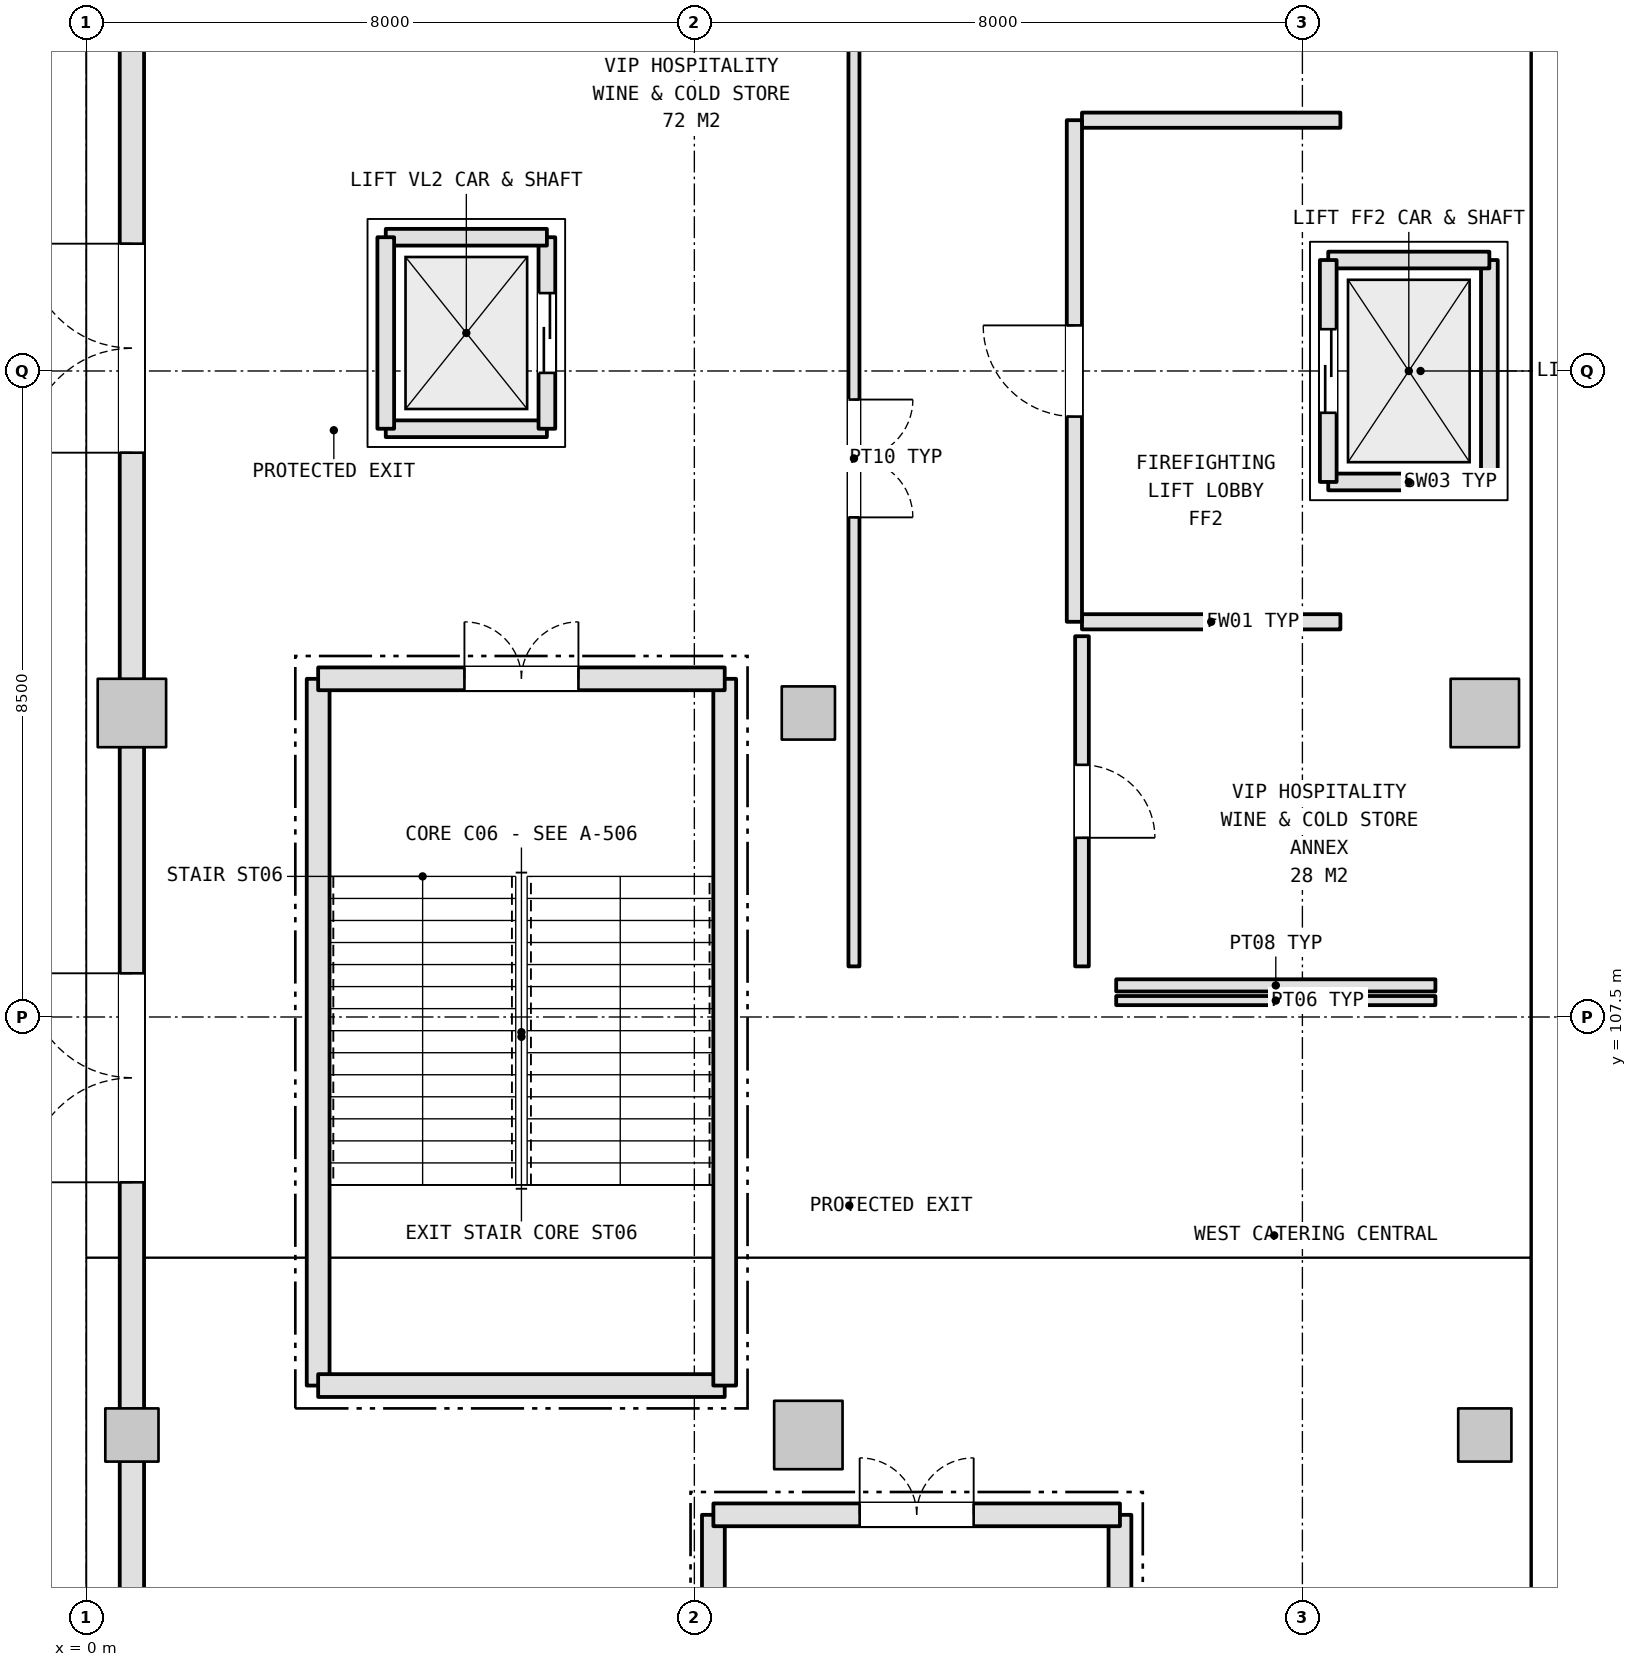
"""IFC4 building model, lengths in metres.
Left out: names, types, materials, properties, quantities, classifications, styles, units other than length and angle.
Written with IfcOpenShell. Run it as: python <this file> out.ifc"""

import sys

from ifc_helpers import new_model, si_unit, direction, frame, frame_2d, origin, origin_2d, place, context, subcontext, project, spatial, rectangle, extrude, element, fill, save


model = new_model("IFC4")
c1 = context("Model", 3, precision=1e-05, world=origin(), true_north=direction((0.0, 1.0)))
c2 = subcontext(c1, "Body", "Model", "MODEL_VIEW")
j1 = project(units=[si_unit("LENGTHUNIT", "METRE"), si_unit("PLANEANGLEUNIT", "RADIAN")], contexts=[c1])
p1 = place(None, origin())
s1 = spatial("IfcSite", under=j1, at=p1, CompositionType="ELEMENT")
p2 = place(p1, origin())
s2 = spatial("IfcBuilding", under=s1, at=p2, CompositionType="ELEMENT")
p3 = place(p2, origin())
s3 = spatial("IfcBuildingStorey", under=s2, at=p3, CompositionType="ELEMENT", Elevation=0.0)
p4 = place(p3, frame((0.6, 102.0, 0.0), z_axis=(0.0, 0.0, 1.0), x_axis=(1.0, 0.0, 0.0)))
e1 = element("IfcColumn", 1, at=p4, inside=s3, PredefinedType="COLUMN", context=c2, shape_type="SweptSolid", body=[
    extrude(rectangle(XDim=0.7, YDim=0.7, at=origin_2d()), origin(), (0.0, 0.0, 1.0), 5.4),
])
for number, where, z_axis, x_axis in (
    (2, (0.6, 111.5, 0.0), (0.0, 0.0, 1.0), (1.0, 0.0, 0.0)),
    (3, (9.5, 102.0, 0.0), (0.0, 0.0, 1.0), (1.0, 0.0, 0.0)),
):
    element("IfcColumn", number, at=place(p3, frame(where, z_axis=z_axis, x_axis=x_axis)), inside=s3, PredefinedType="COLUMN", context=c2, shape_type="SweptSolid", body=[
        extrude(rectangle(XDim=0.9, YDim=0.9, at=origin_2d()), origin(), (0.0, 0.0, 1.0), 5.4),
    ])
for number, where, z_axis, x_axis in (
    (4, (9.5, 111.5, 0.0), (0.0, 0.0, 1.0), (1.0, 0.0, 0.0)),
    (5, (18.4, 102.0, 0.0), (0.0, 0.0, 1.0), (1.0, 0.0, 0.0)),
):
    element("IfcColumn", number, at=place(p3, frame(where, z_axis=z_axis, x_axis=x_axis)), inside=s3, PredefinedType="COLUMN", context=c2, shape_type="SweptSolid", body=[
        extrude(rectangle(XDim=0.7, YDim=0.7, at=origin_2d()), origin(), (0.0, 0.0, 1.0), 5.4),
    ])
p5 = place(p3, frame((18.4, 111.5, 0.0), z_axis=(0.0, 0.0, 1.0), x_axis=(1.0, 0.0, 0.0)))
e6 = element("IfcColumn", 6, at=p5, inside=s3, PredefinedType="COLUMN", context=c2, shape_type="SweptSolid", body=[
    extrude(rectangle(XDim=0.9, YDim=0.9, at=origin_2d()), origin(), (0.0, 0.0, 1.0), 5.4),
])
p6 = place(p3, frame((22.827, 114.239, 0.0), z_axis=(0.0, 0.0, 1.0), x_axis=(-0.19509817024, -0.980783719262, 0.0)))
e7 = element("IfcWall", 7, at=p6, inside=s3, PredefinedType="SOLIDWALL", context=c2, shape_type="SweptSolid", body=[
    extrude(rectangle(XDim=19.188, YDim=0.34, at=frame_2d((9.594, 0.0))), origin(), (0.0, 0.0, 1.0), 4.275),
])
p7 = place(p6, frame((8.794, 0.0, 2.4)))
e8 = element("IfcOpeningElement", 8, at=p7, cuts=e7, PredefinedType="OPENING", context=c2, shape_type="SweptSolid", body=[
    extrude(rectangle(XDim=1.6, YDim=1.2, at=frame_2d((0.8, 0.6))), frame((0.0, 0.18, 0.0), z_axis=(0.0, -1.0, 0.0), x_axis=(1.0, 0.0, 0.0)), (0.0, 0.0, 1.0), 0.36),
])
p8 = place(p3, frame((0.6, 92.938, 0.0), z_axis=(0.0, 0.0, 1.0), x_axis=(0.0, 1.0, 0.0)))
e9 = element("IfcWall", 9, at=p8, inside=s3, PredefinedType="SOLIDWALL", context=c2, shape_type="SweptSolid", body=[
    extrude(rectangle(XDim=8.724, YDim=0.32, at=frame_2d((4.362, 0.0))), origin(), (0.0, 0.0, 1.0), 4.475),
])
p9 = place(p8, frame((3.612, 0.0, 1.05)))
e10 = element("IfcOpeningElement", 10, at=p9, cuts=e9, PredefinedType="OPENING", context=c2, shape_type="SweptSolid", body=[
    extrude(rectangle(XDim=1.5, YDim=1.5, at=frame_2d((0.75, 0.75))), frame((0.0, 0.17, 0.0), z_axis=(0.0, -1.0, 0.0), x_axis=(1.0, 0.0, 0.0)), (0.0, 0.0, 1.0), 0.34),
])
p10 = place(p3, frame((0.6, 102.338, 0.0), z_axis=(0.0, 0.0, 1.0), x_axis=(0.0, 1.0, 0.0)))
e11 = element("IfcWall", 11, at=p10, inside=s3, PredefinedType="SOLIDWALL", context=c2, shape_type="SweptSolid", body=[
    extrude(rectangle(XDim=8.724, YDim=0.32, at=frame_2d((4.362, 0.0))), origin(), (0.0, 0.0, 1.0), 4.475),
])
p11 = place(p10, frame((2.987, 0.0, 0.0)))
e12 = element("IfcOpeningElement", 12, at=p11, cuts=e11, PredefinedType="OPENING", context=c2, shape_type="SweptSolid", body=[
    extrude(rectangle(XDim=2.75, YDim=2.4, at=frame_2d((1.375, 1.2))), frame((0.0, 0.17, 0.0), z_axis=(0.0, -1.0, 0.0), x_axis=(1.0, 0.0, 0.0)), (0.0, 0.0, 1.0), 0.34),
])
p12 = place(p3, frame((0.6, 111.938, 0.0), z_axis=(0.0, 0.0, 1.0), x_axis=(0.0, 1.0, 0.0)))
e13 = element("IfcWall", 13, at=p12, inside=s3, PredefinedType="SOLIDWALL", context=c2, shape_type="SweptSolid", body=[
    extrude(rectangle(XDim=8.724, YDim=0.32, at=frame_2d((4.362, 0.0))), origin(), (0.0, 0.0, 1.0), 4.475),
])
p13 = place(p12, frame((2.987, 0.0, 0.0)))
e14 = element("IfcOpeningElement", 14, at=p13, cuts=e13, PredefinedType="OPENING", context=c2, shape_type="SweptSolid", body=[
    extrude(rectangle(XDim=2.75, YDim=2.4, at=frame_2d((1.375, 1.2))), frame((0.0, 0.17, 0.0), z_axis=(0.0, -1.0, 0.0), x_axis=(1.0, 0.0, 0.0)), (0.0, 0.0, 1.0), 0.34),
])
p14 = place(p3, frame((3.05, 111.95, 0.0), z_axis=(0.0, 0.0, 1.0), x_axis=(0.0, -1.0, 0.0)))
e15 = element("IfcWall", 15, at=p14, inside=s3, PredefinedType="SHEAR", context=c2, shape_type="SweptSolid", body=[
    extrude(rectangle(XDim=9.299, YDim=0.3, at=frame_2d((4.65, 0.0))), origin(), (0.0, 0.0, 1.0), 5.14),
])
p15 = place(p3, frame((3.05, 102.65, 0.0), z_axis=(0.0, 0.0, 1.0), x_axis=(1.0, 0.0, 0.0)))
e16 = element("IfcWall", 16, at=p15, inside=s3, PredefinedType="SHEAR", context=c2, shape_type="SweptSolid", body=[
    extrude(rectangle(XDim=5.349, YDim=0.3, at=frame_2d((2.675, 0.0))), origin(), (0.0, 0.0, 1.0), 5.14),
])
p16 = place(p3, frame((8.4, 102.65, 0.0), z_axis=(0.0, 0.0, 1.0), x_axis=(0.0, 1.0, 0.0)))
e17 = element("IfcWall", 17, at=p16, inside=s3, PredefinedType="SHEAR", context=c2, shape_type="SweptSolid", body=[
    extrude(rectangle(XDim=9.299, YDim=0.3, at=frame_2d((4.65, 0.0))), origin(), (0.0, 0.0, 1.0), 5.14),
])
p17 = place(p3, frame((8.4, 111.95, 0.0), z_axis=(0.0, 0.0, 1.0), x_axis=(-1.0, 0.0, 0.0)))
e18 = element("IfcWall", 18, at=p17, inside=s3, PredefinedType="SHEAR", context=c2, shape_type="SweptSolid", body=[
    extrude(rectangle(XDim=5.349, YDim=0.3, at=frame_2d((2.675, 0.0))), origin(), (0.0, 0.0, 1.0), 5.14),
])
p18 = place(p17, frame((1.925, 0.0, 0.0)))
e19 = element("IfcOpeningElement", 19, at=p18, cuts=e18, PredefinedType="OPENING", context=c2, shape_type="SweptSolid", body=[
    extrude(rectangle(XDim=1.5, YDim=2.2, at=frame_2d((0.75, 1.1))), frame((0.0, 0.16, 0.0), z_axis=(0.0, -1.0, 0.0), x_axis=(1.0, 0.0, 0.0)), (0.0, 0.0, 1.0), 0.32),
])
for number, where, z_axis, x_axis in (
    (20, (8.25, 100.95, 0.0), (0.0, 0.0, 1.0), (0.0, -1.0, 0.0)),
    (21, (13.6, 91.65, 0.0), (0.0, 0.0, 1.0), (0.0, 1.0, 0.0)),
):
    element("IfcWall", number, at=place(p3, frame(where, z_axis=z_axis, x_axis=x_axis)), inside=s3, PredefinedType="SHEAR", context=c2, shape_type="SweptSolid", body=[
        extrude(rectangle(XDim=9.299, YDim=0.3, at=frame_2d((4.65, 0.0))), origin(), (0.0, 0.0, 1.0), 5.14),
    ])
p19 = place(p3, frame((13.6, 100.95, 0.0), z_axis=(0.0, 0.0, 1.0), x_axis=(-1.0, 0.0, 0.0)))
e22 = element("IfcWall", 22, at=p19, inside=s3, PredefinedType="SHEAR", context=c2, shape_type="SweptSolid", body=[
    extrude(rectangle(XDim=5.349, YDim=0.3, at=frame_2d((2.675, 0.0))), origin(), (0.0, 0.0, 1.0), 5.14),
])
p20 = place(p19, frame((1.925, 0.0, 0.0)))
e23 = element("IfcOpeningElement", 23, at=p20, cuts=e22, PredefinedType="OPENING", context=c2, shape_type="SweptSolid", body=[
    extrude(rectangle(XDim=1.5, YDim=2.2, at=frame_2d((0.75, 1.1))), frame((0.0, 0.16, 0.0), z_axis=(0.0, -1.0, 0.0), x_axis=(1.0, 0.0, 0.0)), (0.0, 0.0, 1.0), 0.32),
])
p21 = place(p3, frame((16.34, 114.54, -1.1), z_axis=(0.0, 0.0, 1.0), x_axis=(1.0, 0.0, 0.0)))
e24 = element("IfcWall", 24, at=p21, inside=s3, PredefinedType="SHEAR", context=c2, shape_type="SweptSolid", body=[
    extrude(rectangle(XDim=2.12, YDim=0.22, at=frame_2d((1.06, 0.0))), origin(), (0.0, 0.0, 1.0), 6.24),
])
p22 = place(p3, frame((18.46, 114.54, -1.1), z_axis=(0.0, 0.0, 1.0), x_axis=(0.0, 1.0, 0.0)))
e25 = element("IfcWall", 25, at=p22, inside=s3, PredefinedType="SHEAR", context=c2, shape_type="SweptSolid", body=[
    extrude(rectangle(XDim=2.92, YDim=0.22, at=frame_2d((1.46, 0.0))), origin(), (0.0, 0.0, 1.0), 6.24),
])
p23 = place(p3, frame((18.46, 117.46, -1.1), z_axis=(0.0, 0.0, 1.0), x_axis=(-1.0, 0.0, 0.0)))
e26 = element("IfcWall", 26, at=p23, inside=s3, PredefinedType="SHEAR", context=c2, shape_type="SweptSolid", body=[
    extrude(rectangle(XDim=2.12, YDim=0.22, at=frame_2d((1.06, 0.0))), origin(), (0.0, 0.0, 1.0), 6.24),
])
p24 = place(p3, frame((16.34, 117.46, -1.1), z_axis=(0.0, 0.0, 1.0), x_axis=(0.0, -1.0, 0.0)))
e27 = element("IfcWall", 27, at=p24, inside=s3, PredefinedType="SHEAR", context=c2, shape_type="SweptSolid", body=[
    extrude(rectangle(XDim=2.92, YDim=0.22, at=frame_2d((1.46, 0.0))), origin(), (0.0, 0.0, 1.0), 6.24),
])
p25 = place(p24, frame((0.91, 0.0, 1.1)))
e28 = element("IfcOpeningElement", 28, at=p25, cuts=e27, PredefinedType="OPENING", context=c2, shape_type="SweptSolid", body=[
    extrude(rectangle(XDim=1.1, YDim=2.2, at=frame_2d((0.55, 1.1))), frame((0.0, 0.12, 0.0), z_axis=(0.0, -1.0, 0.0), x_axis=(1.0, 0.0, 0.0)), (0.0, 0.0, 1.0), 0.24),
])
for number, where, z_axis, x_axis in (
    (29, (13.1, 112.7, 0.0), (0.0, 0.0, 1.0), (1.0, 0.0, 0.0)),
    (30, (16.5, 119.3, 0.0), (0.0, 0.0, 1.0), (-1.0, 0.0, 0.0)),
):
    element("IfcWall", number, at=place(p3, frame(where, z_axis=z_axis, x_axis=x_axis)), inside=s3, PredefinedType="SOLIDWALL", context=c2, shape_type="SweptSolid", body=[
        extrude(rectangle(XDim=3.4, YDim=0.2, at=frame_2d((1.7, 0.0))), origin(), (0.0, 0.0, 1.0), 5.12),
    ])
p26 = place(p3, frame((13.0, 119.3, 0.0), z_axis=(0.0, 0.0, 1.0), x_axis=(0.0, -1.0, 0.0)))
e31 = element("IfcWall", 31, at=p26, inside=s3, PredefinedType="SOLIDWALL", context=c2, shape_type="SweptSolid", body=[
    extrude(rectangle(XDim=6.6, YDim=0.2, at=frame_2d((3.3, 0.0))), origin(), (0.0, 0.0, 1.0), 5.12),
])
p27 = place(p26, frame((2.7, 0.0, 0.0)))
e32 = element("IfcOpeningElement", 32, at=p27, cuts=e31, PredefinedType="OPENING", context=c2, shape_type="SweptSolid", body=[
    extrude(rectangle(XDim=1.2, YDim=2.2, at=frame_2d((0.6, 1.1))), frame((0.0, 0.11, 0.0), z_axis=(0.0, -1.0, 0.0), x_axis=(1.0, 0.0, 0.0)), (0.0, 0.0, 1.0), 0.22),
])
p28 = place(p3, frame((3.94, 115.24, -1.1), z_axis=(0.0, 0.0, 1.0), x_axis=(1.0, 0.0, 0.0)))
e33 = element("IfcWall", 33, at=p28, inside=s3, PredefinedType="SHEAR", context=c2, shape_type="SweptSolid", body=[
    extrude(rectangle(XDim=2.12, YDim=0.22, at=frame_2d((1.06, 0.0))), origin(), (0.0, 0.0, 1.0), 6.24),
])
p29 = place(p3, frame((6.06, 115.24, -1.1), z_axis=(0.0, 0.0, 1.0), x_axis=(0.0, 1.0, 0.0)))
e34 = element("IfcWall", 34, at=p29, inside=s3, PredefinedType="SHEAR", context=c2, shape_type="SweptSolid", body=[
    extrude(rectangle(XDim=2.52, YDim=0.22, at=frame_2d((1.26, 0.0))), origin(), (0.0, 0.0, 1.0), 6.24),
])
p30 = place(p29, frame((0.735, 0.0, 1.1)))
e35 = element("IfcOpeningElement", 35, at=p30, cuts=e34, PredefinedType="OPENING", context=c2, shape_type="SweptSolid", body=[
    extrude(rectangle(XDim=1.05, YDim=2.15, at=frame_2d((0.525, 1.075))), frame((0.0, 0.12, 0.0), z_axis=(0.0, -1.0, 0.0), x_axis=(1.0, 0.0, 0.0)), (0.0, 0.0, 1.0), 0.24),
])
p31 = place(p3, frame((6.06, 117.76, -1.1), z_axis=(0.0, 0.0, 1.0), x_axis=(-1.0, 0.0, 0.0)))
e36 = element("IfcWall", 36, at=p31, inside=s3, PredefinedType="SHEAR", context=c2, shape_type="SweptSolid", body=[
    extrude(rectangle(XDim=2.12, YDim=0.22, at=frame_2d((1.06, 0.0))), origin(), (0.0, 0.0, 1.0), 6.24),
])
p32 = place(p3, frame((3.94, 117.76, -1.1), z_axis=(0.0, 0.0, 1.0), x_axis=(0.0, -1.0, 0.0)))
e37 = element("IfcWall", 37, at=p32, inside=s3, PredefinedType="SHEAR", context=c2, shape_type="SweptSolid", body=[
    extrude(rectangle(XDim=2.52, YDim=0.22, at=frame_2d((1.26, 0.0))), origin(), (0.0, 0.0, 1.0), 6.24),
])
p33 = place(p3, frame((13.55, 107.716, 0.0), z_axis=(0.0, 0.0, 1.0), x_axis=(1.0, 0.0, 0.0)))
e38 = element("IfcWall", 38, at=p33, inside=s3, PredefinedType="PARTITIONING", context=c2, shape_type="SweptSolid", body=[
    extrude(rectangle(XDim=4.2, YDim=0.12, at=frame_2d((2.1, 0.0))), origin(), (0.0, 0.0, 1.0), 5.12),
])
p34 = place(p3, frame((10.1, 121.532, 0.0), z_axis=(0.0, 0.0, 1.0), x_axis=(0.0, -1.0, 0.0)))
e39 = element("IfcWall", 39, at=p34, inside=s3, PredefinedType="PARTITIONING", context=c2, shape_type="SweptSolid", body=[
    extrude(rectangle(XDim=13.366, YDim=0.145, at=frame_2d((6.683, 0.0))), origin(), (0.0, 0.0, 1.0), 4.668),
])
p35 = place(p34, frame((5.908, 0.0, 0.0)))
e40 = element("IfcOpeningElement", 40, at=p35, cuts=e39, PredefinedType="OPENING", context=c2, shape_type="SweptSolid", body=[
    extrude(rectangle(XDim=1.55, YDim=2.15, at=frame_2d((0.775, 1.075))), frame((0.0, 0.083, 0.0), z_axis=(0.0, -1.0, 0.0), x_axis=(1.0, 0.0, 0.0)), (0.0, 0.0, 1.0), 0.165),
])
p36 = place(p3, frame((13.1, 108.166, 0.0), z_axis=(0.0, 0.0, 1.0), x_axis=(0.0, 1.0, 0.0)))
e41 = element("IfcWall", 41, at=p36, inside=s3, PredefinedType="PARTITIONING", context=c2, shape_type="SweptSolid", body=[
    extrude(rectangle(XDim=4.344, YDim=0.18, at=frame_2d((2.172, 0.0))), origin(), (0.0, 0.0, 1.0), 4.668),
])
p37 = place(p36, frame((1.692, 0.0, 0.0)))
e42 = element("IfcOpeningElement", 42, at=p37, cuts=e41, PredefinedType="OPENING", context=c2, shape_type="SweptSolid", body=[
    extrude(rectangle(XDim=0.96, YDim=2.15, at=frame_2d((0.48, 1.075))), frame((0.0, 0.1, 0.0), z_axis=(0.0, -1.0, 0.0), x_axis=(1.0, 0.0, 0.0)), (0.0, 0.0, 1.0), 0.2),
])
p38 = place(p3, frame((17.75, 107.916, 0.0), z_axis=(0.0, 0.0, 1.0), x_axis=(-1.0, 0.0, 0.0)))
e43 = element("IfcWall", 43, at=p38, inside=s3, PredefinedType="PARTITIONING", context=c2, shape_type="SweptSolid", body=[
    extrude(rectangle(XDim=4.2, YDim=0.16, at=frame_2d((2.1, 0.0))), origin(), (0.0, 0.0, 1.0), 5.12),
])
p39 = place(p11, origin())
e44 = element("IfcDoor", 44, at=p39, inside=s3, OperationType="DOUBLE_DOOR_SINGLE_SWING", PredefinedType="DOOR", context=c2, shape_type="SweptSolid", body=[
    extrude(rectangle(XDim=2.75, YDim=2.4, at=frame_2d((1.375, 1.2))), frame((0.0, 0.025, 0.0), z_axis=(0.0, -1.0, 0.0), x_axis=(1.0, 0.0, 0.0)), (0.0, 0.0, 1.0), 0.05),
])
fill(e12, e44)
p40 = place(p13, origin())
e45 = element("IfcDoor", 45, at=p40, inside=s3, OperationType="DOUBLE_DOOR_SINGLE_SWING", PredefinedType="DOOR", context=c2, shape_type="SweptSolid", body=[
    extrude(rectangle(XDim=2.75, YDim=2.4, at=frame_2d((1.375, 1.2))), frame((0.0, 0.025, 0.0), z_axis=(0.0, -1.0, 0.0), x_axis=(1.0, 0.0, 0.0)), (0.0, 0.0, 1.0), 0.05),
])
fill(e14, e45)
p41 = place(p18, frame((1.5, 0.0, 0.0), z_axis=(0.0, 0.0, 1.0), x_axis=(-1.0, 0.0, 0.0)))
e46 = element("IfcDoor", 46, at=p41, inside=s3, OperationType="DOUBLE_DOOR_SINGLE_SWING", PredefinedType="DOOR", context=c2, shape_type="SweptSolid", body=[
    extrude(rectangle(XDim=1.5, YDim=2.2, at=frame_2d((0.75, 1.1))), frame((0.0, 0.025, 0.0), z_axis=(0.0, -1.0, 0.0), x_axis=(1.0, 0.0, 0.0)), (0.0, 0.0, 1.0), 0.05),
])
fill(e19, e46)
p42 = place(p20, frame((1.5, 0.0, 0.0), z_axis=(0.0, 0.0, 1.0), x_axis=(-1.0, 0.0, 0.0)))
e47 = element("IfcDoor", 47, at=p42, inside=s3, OperationType="DOUBLE_DOOR_SINGLE_SWING", PredefinedType="DOOR", context=c2, shape_type="SweptSolid", body=[
    extrude(rectangle(XDim=1.5, YDim=2.2, at=frame_2d((0.75, 1.1))), frame((0.0, 0.025, 0.0), z_axis=(0.0, -1.0, 0.0), x_axis=(1.0, 0.0, 0.0)), (0.0, 0.0, 1.0), 0.05),
])
fill(e23, e47)
p43 = place(p25, origin())
e48 = element("IfcDoor", 48, at=p43, inside=s3, OperationType="DOUBLE_DOOR_SLIDING", PredefinedType="DOOR", context=c2, shape_type="SweptSolid", body=[
    extrude(rectangle(XDim=1.1, YDim=2.2, at=frame_2d((0.55, 1.1))), frame((0.0, 0.025, 0.0), z_axis=(0.0, -1.0, 0.0), x_axis=(1.0, 0.0, 0.0)), (0.0, 0.0, 1.0), 0.05),
])
fill(e28, e48)
p44 = place(p27, frame((1.2, 0.0, 0.0), z_axis=(0.0, 0.0, 1.0), x_axis=(-1.0, 0.0, 0.0)))
e49 = element("IfcDoor", 49, at=p44, inside=s3, OperationType="SINGLE_SWING_LEFT", PredefinedType="DOOR", context=c2, shape_type="SweptSolid", body=[
    extrude(rectangle(XDim=1.2, YDim=2.2, at=frame_2d((0.6, 1.1))), frame((0.0, 0.025, 0.0), z_axis=(0.0, -1.0, 0.0), x_axis=(1.0, 0.0, 0.0)), (0.0, 0.0, 1.0), 0.05),
])
fill(e32, e49)
p45 = place(p30, origin())
e50 = element("IfcDoor", 50, at=p45, inside=s3, OperationType="DOUBLE_DOOR_SLIDING", PredefinedType="DOOR", context=c2, shape_type="SweptSolid", body=[
    extrude(rectangle(XDim=1.05, YDim=2.15, at=frame_2d((0.525, 1.075))), frame((0.0, 0.025, 0.0), z_axis=(0.0, -1.0, 0.0), x_axis=(1.0, 0.0, 0.0)), (0.0, 0.0, 1.0), 0.05),
])
fill(e35, e50)
p46 = place(p35, origin())
e51 = element("IfcDoor", 51, at=p46, inside=s3, OperationType="DOUBLE_DOOR_SINGLE_SWING", PredefinedType="DOOR", context=c2, shape_type="SweptSolid", body=[
    extrude(rectangle(XDim=1.55, YDim=2.15, at=frame_2d((0.775, 1.075))), frame((0.0, 0.025, 0.0), z_axis=(0.0, -1.0, 0.0), x_axis=(1.0, 0.0, 0.0)), (0.0, 0.0, 1.0), 0.05),
])
fill(e40, e51)
p47 = place(p37, frame((0.96, 0.0, 0.0), z_axis=(0.0, 0.0, 1.0), x_axis=(-1.0, 0.0, 0.0)))
e52 = element("IfcDoor", 52, at=p47, inside=s3, OperationType="SINGLE_SWING_LEFT", PredefinedType="DOOR", context=c2, shape_type="SweptSolid", body=[
    extrude(rectangle(XDim=0.96, YDim=2.15, at=frame_2d((0.48, 1.075))), frame((0.0, 0.025, 0.0), z_axis=(0.0, -1.0, 0.0), x_axis=(1.0, 0.0, 0.0)), (0.0, 0.0, 1.0), 0.05),
])
fill(e42, e52)
save(model, sys.argv[1])
